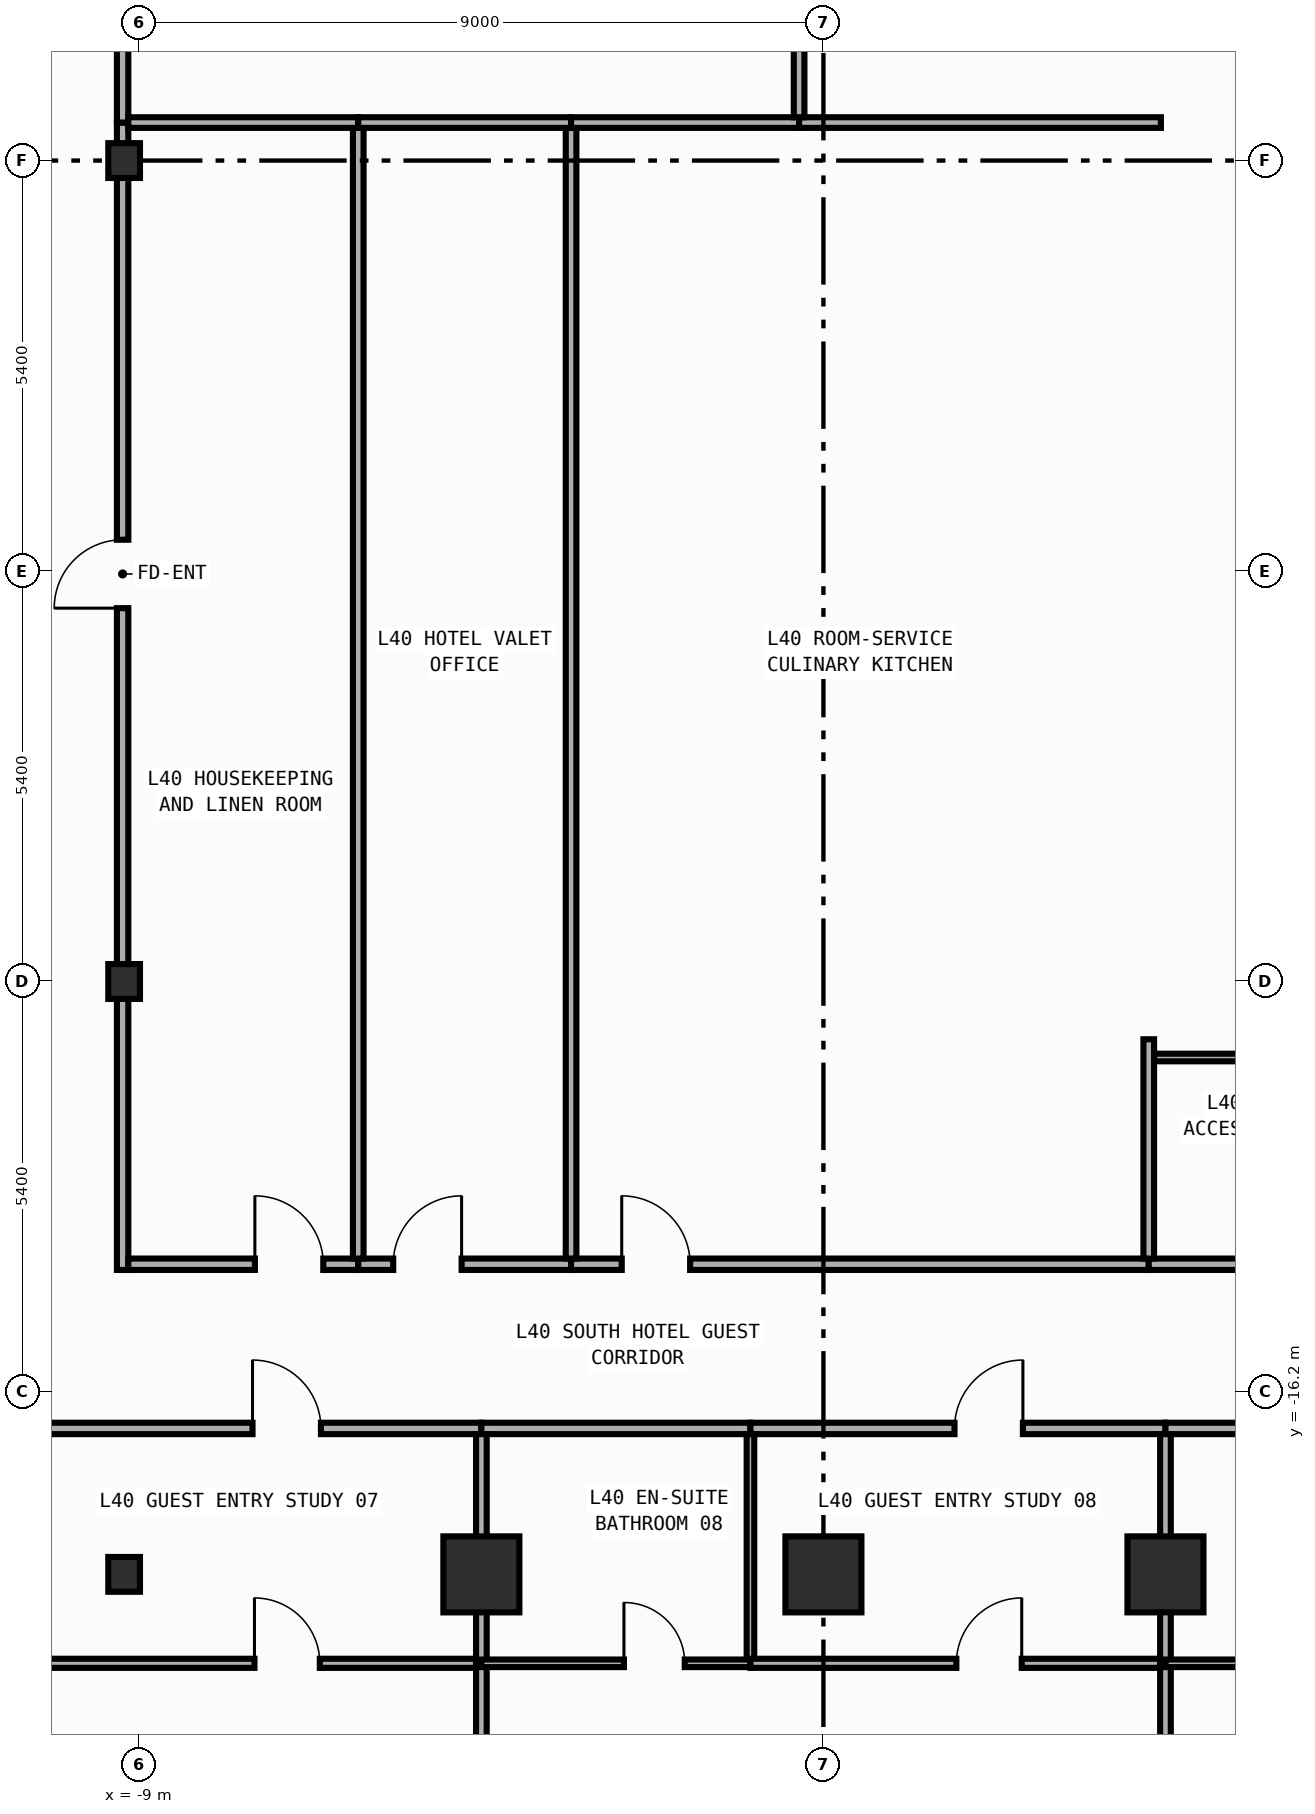
"""IFC4 building model, lengths in metres.
Left out: names, types, materials, properties, quantities, classifications, styles, units other than length and angle.
Written with IfcOpenShell. Run it as: python <this file> out.ifc"""

import sys

from ifc_helpers import new_model, si_unit, direction, frame, frame_2d, origin, origin_2d, place, context, subcontext, project, spatial, rectangle, i_section, extrude, element, fill, save


model = new_model("IFC4")
c1 = context("Model", 3, precision=1e-05, world=origin(), true_north=direction((0.0, 1.0)))
c2 = subcontext(c1, "Body", "Model", "MODEL_VIEW")
j1 = project(units=[si_unit("LENGTHUNIT", "METRE"), si_unit("PLANEANGLEUNIT", "RADIAN")], contexts=[c1])
p1 = place(None, origin())
s1 = spatial("IfcSite", under=j1, at=p1, CompositionType="ELEMENT")
p2 = place(p1, origin())
s2 = spatial("IfcBuilding", under=s1, at=p2, CompositionType="ELEMENT")
p3 = place(p2, frame((0.0, 0.0, 176.4)))
s3 = spatial("IfcBuildingStorey", under=s2, at=p3, CompositionType="ELEMENT", Elevation=176.4)
for number, where, z_axis, x_axis in (
    (1, (-9.2, -18.6, 0.0), (0.0, 0.0, 1.0), (1.0, 0.0, 0.0)),
    (2, (-9.2, -10.8, 0.0), (0.0, 0.0, 1.0), (1.0, 0.0, 0.0)),
    (3, (-9.2, 0.0, 0.0), (0.0, 0.0, 1.0), (1.0, 0.0, 0.0)),
):
    element("IfcColumn", number, at=place(p3, frame(where, z_axis=z_axis, x_axis=x_axis)), inside=s3, PredefinedType="COLUMN", context=c2, shape_type="SweptSolid", body=[
        extrude(i_section(OverallWidth=0.417, OverallDepth=0.458, WebThickness=0.03, FlangeThickness=0.05, FilletRadius=0.022, at=origin_2d()), origin(), (0.0, 0.0, 1.0), 3.8),
    ])
for number, where, z_axis, x_axis in (
    (4, (-4.5, -18.6, 0.0), (0.0, 0.0, 1.0), (1.0, 0.0, 0.0)),
    (5, (0.0, -18.6, 0.0), (0.0, 0.0, 1.0), (1.0, 0.0, 0.0)),
    (6, (4.5, -18.6, 0.0), (0.0, 0.0, 1.0), (1.0, 0.0, 0.0)),
):
    element("IfcColumn", number, at=place(p3, frame(where, z_axis=z_axis, x_axis=x_axis)), inside=s3, PredefinedType="COLUMN", context=c2, shape_type="SweptSolid", body=[
        extrude(rectangle(XDim=1.0, YDim=1.0, at=origin_2d()), origin(), (0.0, 0.0, 1.0), 3.8),
    ])
p4 = place(p3, frame((-9.22, -14.595, 0.0), z_axis=(0.0, 0.0, 1.0), x_axis=(0.0, 1.0, 0.0)))
e7 = element("IfcWall", 7, at=p4, inside=s3, PredefinedType="PARTITIONING", context=c2, shape_type="SweptSolid", body=[
    extrude(rectangle(XDim=15.095, YDim=0.15, at=frame_2d((7.547, 0.0))), origin(), (0.0, 0.0, 1.0), 2.952),
])
p5 = place(p4, frame((8.707, 0.0, 0.0)))
e8 = element("IfcOpeningElement", 8, at=p5, cuts=e7, PredefinedType="OPENING", context=c2, shape_type="SweptSolid", body=[
    extrude(rectangle(XDim=0.9, YDim=2.15, at=frame_2d((0.45, 1.075))), frame((0.0, 0.085, 0.0), z_axis=(0.0, -1.0, 0.0), x_axis=(1.0, 0.0, 0.0)), (0.0, 0.0, 1.0), 0.17),
])
p6 = place(p3, frame((-9.22, 0.5, 0.0), z_axis=(0.0, 0.0, 1.0), x_axis=(0.0, 1.0, 0.0)))
e9 = element("IfcWall", 9, at=p6, inside=s3, PredefinedType="PARTITIONING", context=c2, shape_type="SweptSolid", body=[
    extrude(rectangle(XDim=15.395, YDim=0.15, at=frame_2d((7.698, 0.0))), origin(), (0.0, 0.0, 1.0), 2.952),
])
p7 = place(p6, frame((4.512, 0.0, 0.0)))
e10 = element("IfcOpeningElement", 10, at=p7, cuts=e9, PredefinedType="OPENING", context=c2, shape_type="SweptSolid", body=[
    extrude(rectangle(XDim=0.9, YDim=2.15, at=frame_2d((0.45, 1.075))), frame((0.0, 0.085, 0.0), z_axis=(0.0, -1.0, 0.0), x_axis=(1.0, 0.0, 0.0)), (0.0, 0.0, 1.0), 0.17),
])
p8 = place(p3, frame((-9.145, -14.52, 0.0), z_axis=(0.0, 0.0, 1.0), x_axis=(1.0, 0.0, 0.0)))
e11 = element("IfcWall", 11, at=p8, inside=s3, PredefinedType="PARTITIONING", context=c2, shape_type="SweptSolid", body=[
    extrude(rectangle(XDim=3.025, YDim=0.15, at=frame_2d((1.512, 0.0))), origin(), (0.0, 0.0, 1.0), 3.54),
])
p9 = place(p8, frame((1.665, 0.0, 0.0)))
e12 = element("IfcOpeningElement", 12, at=p9, cuts=e11, PredefinedType="OPENING", context=c2, shape_type="SweptSolid", body=[
    extrude(rectangle(XDim=0.9, YDim=2.15, at=frame_2d((0.45, 1.075))), frame((0.0, 0.085, 0.0), z_axis=(0.0, -1.0, 0.0), x_axis=(1.0, 0.0, 0.0)), (0.0, 0.0, 1.0), 0.17),
])
p10 = place(p3, frame((-6.12, -14.52, 0.0), z_axis=(0.0, 0.0, 1.0), x_axis=(1.0, 0.0, 0.0)))
e13 = element("IfcWall", 13, at=p10, inside=s3, PredefinedType="PARTITIONING", context=c2, shape_type="SweptSolid", body=[
    extrude(rectangle(XDim=2.8, YDim=0.15, at=frame_2d((1.4, 0.0))), origin(), (0.0, 0.0, 1.0), 3.54),
])
p11 = place(p10, frame((0.46, 0.0, 0.0)))
e14 = element("IfcOpeningElement", 14, at=p11, cuts=e13, PredefinedType="OPENING", context=c2, shape_type="SweptSolid", body=[
    extrude(rectangle(XDim=0.9, YDim=2.15, at=frame_2d((0.45, 1.075))), frame((0.0, 0.085, 0.0), z_axis=(0.0, -1.0, 0.0), x_axis=(1.0, 0.0, 0.0)), (0.0, 0.0, 1.0), 0.17),
])
p12 = place(p3, frame((-3.32, -14.52, 0.0), z_axis=(0.0, 0.0, 1.0), x_axis=(1.0, 0.0, 0.0)))
e15 = element("IfcWall", 15, at=p12, inside=s3, PredefinedType="PARTITIONING", context=c2, shape_type="SweptSolid", body=[
    extrude(rectangle(XDim=7.6, YDim=0.15, at=frame_2d((3.8, 0.0))), origin(), (0.0, 0.0, 1.0), 3.54),
])
p13 = place(p12, frame((0.667, 0.0, 0.0)))
e16 = element("IfcOpeningElement", 16, at=p13, cuts=e15, PredefinedType="OPENING", context=c2, shape_type="SweptSolid", body=[
    extrude(rectangle(XDim=0.9, YDim=2.15, at=frame_2d((0.45, 1.075))), frame((0.0, 0.085, 0.0), z_axis=(0.0, -1.0, 0.0), x_axis=(1.0, 0.0, 0.0)), (0.0, 0.0, 1.0), 0.17),
])
p14 = place(p3, frame((4.28, -14.52, 0.0), z_axis=(0.0, 0.0, 1.0), x_axis=(1.0, 0.0, 0.0)))
e17 = element("IfcWall", 17, at=p14, inside=s3, PredefinedType="PARTITIONING", context=c2, shape_type="SweptSolid", body=[
    extrude(rectangle(XDim=2.9, YDim=0.15, at=frame_2d((1.45, 0.0))), origin(), (0.0, 0.0, 1.0), 3.54),
])
p15 = place(p14, frame((1.54, 0.0, 0.0)))
e18 = element("IfcOpeningElement", 18, at=p15, cuts=e17, PredefinedType="OPENING", context=c2, shape_type="SweptSolid", body=[
    extrude(rectangle(XDim=0.9, YDim=2.15, at=frame_2d((0.45, 1.075))), frame((0.0, 0.085, 0.0), z_axis=(0.0, -1.0, 0.0), x_axis=(1.0, 0.0, 0.0)), (0.0, 0.0, 1.0), 0.17),
])
p16 = place(p3, frame((-10.86, -16.68, 0.0), z_axis=(0.0, 0.0, 1.0), x_axis=(1.0, 0.0, 0.0)))
e19 = element("IfcWall", 19, at=p16, inside=s3, PredefinedType="PARTITIONING", context=c2, shape_type="SweptSolid", body=[
    extrude(rectangle(XDim=6.36, YDim=0.15, at=frame_2d((3.18, 0.0))), origin(), (0.0, 0.0, 1.0), 3.54),
])
p17 = place(p16, frame((3.349, 0.0, 0.0)))
e20 = element("IfcOpeningElement", 20, at=p17, cuts=e19, PredefinedType="OPENING", context=c2, shape_type="SweptSolid", body=[
    extrude(rectangle(XDim=0.9, YDim=2.15, at=frame_2d((0.45, 1.075))), frame((0.0, 0.085, 0.0), z_axis=(0.0, -1.0, 0.0), x_axis=(1.0, 0.0, 0.0)), (0.0, 0.0, 1.0), 0.17),
])
p18 = place(p3, frame((-4.5, -16.68, 0.0), z_axis=(0.0, 0.0, 1.0), x_axis=(1.0, 0.0, 0.0)))
e21 = element("IfcWall", 21, at=p18, inside=s3, PredefinedType="PARTITIONING", context=c2, shape_type="SweptSolid", body=[
    extrude(rectangle(XDim=3.54, YDim=0.15, at=frame_2d((1.77, 0.0))), origin(), (0.0, 0.0, 1.0), 3.54),
])
p19 = place(p3, frame((-0.96, -16.68, 0.0), z_axis=(0.0, 0.0, 1.0), x_axis=(1.0, 0.0, 0.0)))
e22 = element("IfcWall", 22, at=p19, inside=s3, PredefinedType="PARTITIONING", context=c2, shape_type="SweptSolid", body=[
    extrude(rectangle(XDim=5.46, YDim=0.15, at=frame_2d((2.73, 0.0))), origin(), (0.0, 0.0, 1.0), 3.54),
])
p20 = place(p19, frame((2.684, 0.0, 0.0)))
e23 = element("IfcOpeningElement", 23, at=p20, cuts=e22, PredefinedType="OPENING", context=c2, shape_type="SweptSolid", body=[
    extrude(rectangle(XDim=0.9, YDim=2.15, at=frame_2d((0.45, 1.075))), frame((0.0, 0.085, 0.0), z_axis=(0.0, -1.0, 0.0), x_axis=(1.0, 0.0, 0.0)), (0.0, 0.0, 1.0), 0.17),
])
p21 = place(p3, frame((4.5, -16.68, 0.0), z_axis=(0.0, 0.0, 1.0), x_axis=(1.0, 0.0, 0.0)))
e24 = element("IfcWall", 24, at=p21, inside=s3, PredefinedType="PARTITIONING", context=c2, shape_type="SweptSolid", body=[
    extrude(rectangle(XDim=3.54, YDim=0.15, at=frame_2d((1.77, 0.0))), origin(), (0.0, 0.0, 1.0), 3.54),
])
p22 = place(p3, frame((-6.12, -14.445, 0.0), z_axis=(0.0, 0.0, 1.0), x_axis=(0.0, 1.0, 0.0)))
e25 = element("IfcWall", 25, at=p22, inside=s3, PredefinedType="PARTITIONING", context=c2, shape_type="SweptSolid", body=[
    extrude(rectangle(XDim=14.875, YDim=0.14, at=frame_2d((7.438, 0.0))), origin(), (0.0, 0.0, 1.0), 3.54),
])
p23 = place(p3, frame((-9.145, 0.5, 0.0), z_axis=(0.0, 0.0, 1.0), x_axis=(1.0, 0.0, 0.0)))
e26 = element("IfcWall", 26, at=p23, inside=s3, PredefinedType="PARTITIONING", context=c2, shape_type="SweptSolid", body=[
    extrude(rectangle(XDim=3.025, YDim=0.14, at=frame_2d((1.512, 0.0))), origin(), (0.0, 0.0, 1.0), 3.54),
])
p24 = place(p3, frame((-3.32, -14.445, 0.0), z_axis=(0.0, 0.0, 1.0), x_axis=(0.0, 1.0, 0.0)))
e27 = element("IfcWall", 27, at=p24, inside=s3, PredefinedType="PARTITIONING", context=c2, shape_type="SweptSolid", body=[
    extrude(rectangle(XDim=14.875, YDim=0.14, at=frame_2d((7.438, 0.0))), origin(), (0.0, 0.0, 1.0), 3.54),
])
p25 = place(p3, frame((-6.12, 0.5, 0.0), z_axis=(0.0, 0.0, 1.0), x_axis=(1.0, 0.0, 0.0)))
e28 = element("IfcWall", 28, at=p25, inside=s3, PredefinedType="PARTITIONING", context=c2, shape_type="SweptSolid", body=[
    extrude(rectangle(XDim=2.8, YDim=0.14, at=frame_2d((1.4, 0.0))), origin(), (0.0, 0.0, 1.0), 3.54),
])
p26 = place(p3, frame((4.28, -14.445, 0.0), z_axis=(0.0, 0.0, 1.0), x_axis=(0.0, 1.0, 0.0)))
e29 = element("IfcWall", 29, at=p26, inside=s3, PredefinedType="PARTITIONING", context=c2, shape_type="SweptSolid", body=[
    extrude(rectangle(XDim=2.885, YDim=0.14, at=frame_2d((1.442, 0.0))), origin(), (0.0, 0.0, 1.0), 3.54),
])
p27 = place(p3, frame((-3.32, 0.5, 0.0), z_axis=(0.0, 0.0, 1.0), x_axis=(1.0, 0.0, 0.0)))
e30 = element("IfcWall", 30, at=p27, inside=s3, PredefinedType="PARTITIONING", context=c2, shape_type="SweptSolid", body=[
    extrude(rectangle(XDim=3.0, YDim=0.14, at=frame_2d((1.5, 0.0))), origin(), (0.0, 0.0, 1.0), 3.54),
])
p28 = place(p3, frame((-0.32, 0.5, 0.0), z_axis=(0.0, 0.0, 1.0), x_axis=(1.0, 0.0, 0.0)))
e31 = element("IfcWall", 31, at=p28, inside=s3, PredefinedType="PARTITIONING", context=c2, shape_type="SweptSolid", body=[
    extrude(rectangle(XDim=4.76, YDim=0.14, at=frame_2d((2.38, 0.0))), origin(), (0.0, 0.0, 1.0), 3.54),
])
p29 = place(p3, frame((-0.32, 0.57, 0.0), z_axis=(0.0, 0.0, 1.0), x_axis=(0.0, 1.0, 0.0)))
e32 = element("IfcWall", 32, at=p29, inside=s3, PredefinedType="PARTITIONING", context=c2, shape_type="SweptSolid", body=[
    extrude(rectangle(XDim=15.175, YDim=0.14, at=frame_2d((7.587, 0.0))), origin(), (0.0, 0.0, 1.0), 3.54),
])
p30 = place(p3, frame((-10.86, -19.77, 0.0), z_axis=(0.0, 0.0, 1.0), x_axis=(1.0, 0.0, 0.0)))
e33 = element("IfcWall", 33, at=p30, inside=s3, PredefinedType="PARTITIONING", context=c2, shape_type="SweptSolid", body=[
    extrude(rectangle(XDim=6.36, YDim=0.12, at=frame_2d((3.18, 0.0))), origin(), (0.0, 0.0, 1.0), 3.54),
])
p31 = place(p30, frame((3.375, 0.0, 0.0)))
e34 = element("IfcOpeningElement", 34, at=p31, cuts=e33, PredefinedType="OPENING", context=c2, shape_type="SweptSolid", body=[
    extrude(rectangle(XDim=0.86, YDim=2.15, at=frame_2d((0.43, 1.075))), frame((0.0, 0.07, 0.0), z_axis=(0.0, -1.0, 0.0), x_axis=(1.0, 0.0, 0.0)), (0.0, 0.0, 1.0), 0.14),
])
p32 = place(p3, frame((-4.5, -19.77, 0.0), z_axis=(0.0, 0.0, 1.0), x_axis=(0.0, 1.0, 0.0)))
e35 = element("IfcWall", 35, at=p32, inside=s3, PredefinedType="PARTITIONING", context=c2, shape_type="SweptSolid", body=[
    extrude(rectangle(XDim=3.015, YDim=0.14, at=frame_2d((1.508, 0.0))), origin(), (0.0, 0.0, 1.0), 3.54),
])
p33 = place(p3, frame((-4.5, -25.292, 0.0), z_axis=(0.0, 0.0, 1.0), x_axis=(0.0, 1.0, 0.0)))
e36 = element("IfcWall", 36, at=p33, inside=s3, PredefinedType="PARTITIONING", context=c2, shape_type="SweptSolid", body=[
    extrude(rectangle(XDim=5.522, YDim=0.14, at=frame_2d((2.761, 0.0))), origin(), (0.0, 0.0, 1.0), 3.54),
])
p34 = place(p3, frame((-0.96, -19.72, 0.0), z_axis=(0.0, 0.0, 1.0), x_axis=(0.0, 1.0, 0.0)))
e37 = element("IfcWall", 37, at=p34, inside=s3, PredefinedType="PARTITIONING", context=c2, shape_type="SweptSolid", body=[
    extrude(rectangle(XDim=2.965, YDim=0.1, at=frame_2d((1.482, 0.0))), origin(), (0.0, 0.0, 1.0), 3.54),
])
p35 = place(p3, frame((-4.5, -19.77, 0.0), z_axis=(0.0, 0.0, 1.0), x_axis=(1.0, 0.0, 0.0)))
e38 = element("IfcWall", 38, at=p35, inside=s3, PredefinedType="PARTITIONING", context=c2, shape_type="SweptSolid", body=[
    extrude(rectangle(XDim=3.54, YDim=0.1, at=frame_2d((1.77, 0.0))), origin(), (0.0, 0.0, 1.0), 3.54),
])
p36 = place(p35, frame((1.875, 0.0, 0.0)))
e39 = element("IfcOpeningElement", 39, at=p36, cuts=e38, PredefinedType="OPENING", context=c2, shape_type="SweptSolid", body=[
    extrude(rectangle(XDim=0.8, YDim=2.1, at=frame_2d((0.4, 1.05))), frame((0.0, 0.06, 0.0), z_axis=(0.0, -1.0, 0.0), x_axis=(1.0, 0.0, 0.0)), (0.0, 0.0, 1.0), 0.12),
])
p37 = place(p3, frame((-0.96, -19.77, 0.0), z_axis=(0.0, 0.0, 1.0), x_axis=(1.0, 0.0, 0.0)))
e40 = element("IfcWall", 40, at=p37, inside=s3, PredefinedType="PARTITIONING", context=c2, shape_type="SweptSolid", body=[
    extrude(rectangle(XDim=5.46, YDim=0.12, at=frame_2d((2.73, 0.0))), origin(), (0.0, 0.0, 1.0), 3.54),
])
p38 = place(p37, frame((2.709, 0.0, 0.0)))
e41 = element("IfcOpeningElement", 41, at=p38, cuts=e40, PredefinedType="OPENING", context=c2, shape_type="SweptSolid", body=[
    extrude(rectangle(XDim=0.86, YDim=2.15, at=frame_2d((0.43, 1.075))), frame((0.0, 0.07, 0.0), z_axis=(0.0, -1.0, 0.0), x_axis=(1.0, 0.0, 0.0)), (0.0, 0.0, 1.0), 0.14),
])
p39 = place(p3, frame((4.5, -19.77, 0.0), z_axis=(0.0, 0.0, 1.0), x_axis=(0.0, 1.0, 0.0)))
e42 = element("IfcWall", 42, at=p39, inside=s3, PredefinedType="PARTITIONING", context=c2, shape_type="SweptSolid", body=[
    extrude(rectangle(XDim=3.015, YDim=0.14, at=frame_2d((1.508, 0.0))), origin(), (0.0, 0.0, 1.0), 3.54),
])
p40 = place(p3, frame((4.5, -25.248, 0.0), z_axis=(0.0, 0.0, 1.0), x_axis=(0.0, 1.0, 0.0)))
e43 = element("IfcWall", 43, at=p40, inside=s3, PredefinedType="PARTITIONING", context=c2, shape_type="SweptSolid", body=[
    extrude(rectangle(XDim=5.478, YDim=0.14, at=frame_2d((2.739, 0.0))), origin(), (0.0, 0.0, 1.0), 3.54),
])
p41 = place(p3, frame((4.5, -19.77, 0.0), z_axis=(0.0, 0.0, 1.0), x_axis=(1.0, 0.0, 0.0)))
e44 = element("IfcWall", 44, at=p41, inside=s3, PredefinedType="PARTITIONING", context=c2, shape_type="SweptSolid", body=[
    extrude(rectangle(XDim=3.54, YDim=0.1, at=frame_2d((1.77, 0.0))), origin(), (0.0, 0.0, 1.0), 3.54),
])
p42 = place(p41, frame((2.078, 0.0, 0.0)))
e45 = element("IfcOpeningElement", 45, at=p42, cuts=e44, PredefinedType="OPENING", context=c2, shape_type="SweptSolid", body=[
    extrude(rectangle(XDim=0.8, YDim=2.1, at=frame_2d((0.4, 1.05))), frame((0.0, 0.06, 0.0), z_axis=(0.0, -1.0, 0.0), x_axis=(1.0, 0.0, 0.0)), (0.0, 0.0, 1.0), 0.12),
])
p43 = place(p3, frame((4.35, -11.8, 0.0), z_axis=(0.0, 0.0, 1.0), x_axis=(1.0, 0.0, 0.0)))
e46 = element("IfcWall", 46, at=p43, inside=s3, PredefinedType="PARTITIONING", context=c2, shape_type="SweptSolid", body=[
    extrude(rectangle(XDim=2.76, YDim=0.1, at=frame_2d((1.38, 0.0))), origin(), (0.0, 0.0, 1.0), 3.54),
])
p44 = place(p5, origin())
e47 = element("IfcDoor", 47, at=p44, inside=s3, OperationType="SINGLE_SWING_LEFT", PredefinedType="DOOR", context=c2, shape_type="SweptSolid", body=[
    extrude(rectangle(XDim=0.9, YDim=2.15, at=frame_2d((0.45, 1.075))), frame((0.0, 0.025, 0.0), z_axis=(0.0, -1.0, 0.0), x_axis=(1.0, 0.0, 0.0)), (0.0, 0.0, 1.0), 0.05),
])
fill(e8, e47)
p45 = place(p9, origin())
e48 = element("IfcDoor", 48, at=p45, inside=s3, OperationType="SINGLE_SWING_LEFT", PredefinedType="DOOR", context=c2, shape_type="SweptSolid", body=[
    extrude(rectangle(XDim=0.9, YDim=2.15, at=frame_2d((0.45, 1.075))), frame((0.0, 0.025, 0.0), z_axis=(0.0, -1.0, 0.0), x_axis=(1.0, 0.0, 0.0)), (0.0, 0.0, 1.0), 0.05),
])
fill(e12, e48)
p46 = place(p11, origin())
e49 = element("IfcDoor", 49, at=p46, inside=s3, OperationType="SINGLE_SWING_RIGHT", PredefinedType="DOOR", context=c2, shape_type="SweptSolid", body=[
    extrude(rectangle(XDim=0.9, YDim=2.15, at=frame_2d((0.45, 1.075))), frame((0.0, 0.025, 0.0), z_axis=(0.0, -1.0, 0.0), x_axis=(1.0, 0.0, 0.0)), (0.0, 0.0, 1.0), 0.05),
])
fill(e14, e49)
p47 = place(p13, origin())
e50 = element("IfcDoor", 50, at=p47, inside=s3, OperationType="SINGLE_SWING_LEFT", PredefinedType="DOOR", context=c2, shape_type="SweptSolid", body=[
    extrude(rectangle(XDim=0.9, YDim=2.15, at=frame_2d((0.45, 1.075))), frame((0.0, 0.025, 0.0), z_axis=(0.0, -1.0, 0.0), x_axis=(1.0, 0.0, 0.0)), (0.0, 0.0, 1.0), 0.05),
])
fill(e16, e50)
p48 = place(p17, origin())
e51 = element("IfcDoor", 51, at=p48, inside=s3, OperationType="SINGLE_SWING_LEFT", PredefinedType="DOOR", context=c2, shape_type="SweptSolid", body=[
    extrude(rectangle(XDim=0.9, YDim=2.15, at=frame_2d((0.45, 1.075))), frame((0.0, 0.025, 0.0), z_axis=(0.0, -1.0, 0.0), x_axis=(1.0, 0.0, 0.0)), (0.0, 0.0, 1.0), 0.05),
])
fill(e20, e51)
p49 = place(p20, origin())
e52 = element("IfcDoor", 52, at=p49, inside=s3, OperationType="SINGLE_SWING_RIGHT", PredefinedType="DOOR", context=c2, shape_type="SweptSolid", body=[
    extrude(rectangle(XDim=0.9, YDim=2.15, at=frame_2d((0.45, 1.075))), frame((0.0, 0.025, 0.0), z_axis=(0.0, -1.0, 0.0), x_axis=(1.0, 0.0, 0.0)), (0.0, 0.0, 1.0), 0.05),
])
fill(e23, e52)
p50 = place(p31, origin())
e53 = element("IfcDoor", 53, at=p50, inside=s3, OperationType="SINGLE_SWING_LEFT", PredefinedType="DOOR", context=c2, shape_type="SweptSolid", body=[
    extrude(rectangle(XDim=0.86, YDim=2.15, at=frame_2d((0.43, 1.075))), frame((0.0, 0.025, 0.0), z_axis=(0.0, -1.0, 0.0), x_axis=(1.0, 0.0, 0.0)), (0.0, 0.0, 1.0), 0.05),
])
fill(e34, e53)
p51 = place(p36, origin())
e54 = element("IfcDoor", 54, at=p51, inside=s3, OperationType="SINGLE_SWING_LEFT", PredefinedType="DOOR", context=c2, shape_type="SweptSolid", body=[
    extrude(rectangle(XDim=0.8, YDim=2.1, at=frame_2d((0.4, 1.05))), frame((0.0, 0.025, 0.0), z_axis=(0.0, -1.0, 0.0), x_axis=(1.0, 0.0, 0.0)), (0.0, 0.0, 1.0), 0.05),
])
fill(e39, e54)
p52 = place(p38, origin())
e55 = element("IfcDoor", 55, at=p52, inside=s3, OperationType="SINGLE_SWING_RIGHT", PredefinedType="DOOR", context=c2, shape_type="SweptSolid", body=[
    extrude(rectangle(XDim=0.86, YDim=2.15, at=frame_2d((0.43, 1.075))), frame((0.0, 0.025, 0.0), z_axis=(0.0, -1.0, 0.0), x_axis=(1.0, 0.0, 0.0)), (0.0, 0.0, 1.0), 0.05),
])
fill(e41, e55)
save(model, sys.argv[1])
